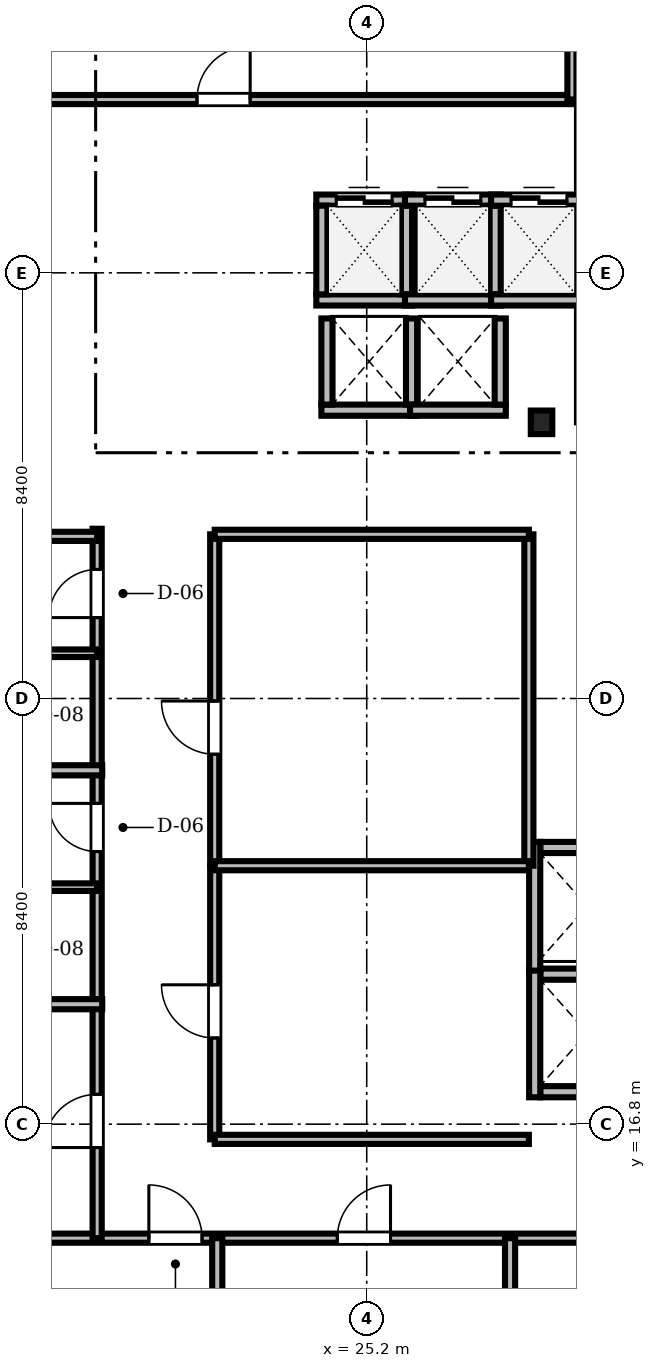
"""IFC4 building model, lengths in metres.
Left out: names, types, materials, properties, quantities, classifications, styles, units other than length and angle.
Written with IfcOpenShell. Run it as: python <this file> out.ifc"""

import sys

from ifc_helpers import new_model, si_unit, direction, frame, frame_2d, origin, origin_2d, place, context, subcontext, project, spatial, rectangle, i_section, extrude, source, transform, mapped, element, fill, save


model = new_model("IFC4")
c1 = context("Model", 3, precision=1e-05, world=origin(), true_north=direction((0.0, 1.0)))
c2 = subcontext(c1, "Body", "Model", "MODEL_VIEW")
j1 = project(units=[si_unit("LENGTHUNIT", "METRE"), si_unit("PLANEANGLEUNIT", "RADIAN")], contexts=[c1])
p1 = place(None, origin())
s1 = spatial("IfcSite", under=j1, at=p1, CompositionType="ELEMENT")
p2 = place(p1, origin())
s2 = spatial("IfcBuilding", under=s1, at=p2, CompositionType="ELEMENT")
p3 = place(p2, frame((0.0, 0.0, 144.6)))
s3 = spatial("IfcBuildingStorey", under=s2, at=p3, CompositionType="ELEMENT", Elevation=144.6)
m1 = source(origin(), c2, "Body", "SweptSolid", [
    extrude(i_section(OverallWidth=0.424, OverallDepth=0.465, WebThickness=0.035, FlangeThickness=0.056, FilletRadius=0.015, at=origin_2d()), origin(), (0.0, 0.0, 1.0), 3.46),
])
p4 = place(p3, frame((28.65, 30.65, 0.0), z_axis=(0.0, 0.0, 1.0), x_axis=(1.0, 0.0, 0.0)))
e1 = element("IfcColumn", 1, at=p4, inside=s3, PredefinedType="COLUMN", context=c2, shape_type="MappedRepresentation", body=[
    mapped(m1, transform((0.0, 0.0, 0.0), scale=1.0)),
])
m2 = source(origin(), c2, "Body", "SweptSolid", [
    extrude(rectangle(XDim=1.89, YDim=0.22, at=frame_2d((0.945, 0.0))), origin(), (0.0, 0.0, 1.0), 3.46),
])
p5 = place(p3, frame((24.205, 33.065, 0.0), z_axis=(0.0, 0.0, 1.0), x_axis=(1.0, 0.0, 0.0)))
e2 = element("IfcWall", 2, at=p5, inside=s3, PredefinedType="SOLIDWALL", context=c2, shape_type="MappedRepresentation", body=[
    mapped(m2, transform((0.0, 0.0, 0.0), scale=1.0)),
])
p6 = place(p3, frame((24.205, 35.035, 0.0), z_axis=(0.0, 0.0, 1.0), x_axis=(1.0, 0.0, 0.0)))
e3 = element("IfcWall", 3, at=p6, inside=s3, PredefinedType="SOLIDWALL", context=c2, shape_type="MappedRepresentation", body=[
    mapped(m2, transform((0.0, 0.0, 0.0), scale=1.0)),
])
m3 = source(origin(), c2, "Body", "SweptSolid", [
    extrude(rectangle(XDim=1.1, YDim=2.2, at=frame_2d((0.55, 1.1))), frame((0.0, 0.12, 0.0), z_axis=(0.0, -1.0, 0.0), x_axis=(1.0, 0.0, 0.0)), (0.0, 0.0, 1.0), 0.24),
])
p7 = place(p6, frame((0.395, 0.0, 0.0)))
e4 = element("IfcOpeningElement", 4, at=p7, cuts=e3, PredefinedType="OPENING", context=c2, shape_type="MappedRepresentation", body=[
    mapped(m3, transform((0.0, 0.0, 0.0), scale=1.0)),
])
m4 = source(origin(), c2, "Body", "SweptSolid", [
    extrude(rectangle(XDim=1.75, YDim=0.22, at=frame_2d((0.875, 0.0))), origin(), (0.0, 0.0, 1.0), 3.46),
])
for number, where, z_axis, x_axis in (
    (5, (24.315, 33.175, 0.0), (0.0, 0.0, 1.0), (0.0, 1.0, 0.0)),
    (6, (25.985, 33.175, 0.0), (0.0, 0.0, 1.0), (0.0, 1.0, 0.0)),
):
    element("IfcWall", number, at=place(p3, frame(where, z_axis=z_axis, x_axis=x_axis)), inside=s3, PredefinedType="SOLIDWALL", context=c2, shape_type="MappedRepresentation", body=[
        mapped(m4, transform((0.0, 0.0, 0.0), scale=1.0)),
    ])
p8 = place(p3, frame((25.955, 33.065, 0.0), z_axis=(0.0, 0.0, 1.0), x_axis=(1.0, 0.0, 0.0)))
e7 = element("IfcWall", 7, at=p8, inside=s3, PredefinedType="SOLIDWALL", context=c2, shape_type="MappedRepresentation", body=[
    mapped(m2, transform((0.0, 0.0, 0.0), scale=1.0)),
])
p9 = place(p3, frame((25.955, 35.035, 0.0), z_axis=(0.0, 0.0, 1.0), x_axis=(1.0, 0.0, 0.0)))
e8 = element("IfcWall", 8, at=p9, inside=s3, PredefinedType="SOLIDWALL", context=c2, shape_type="MappedRepresentation", body=[
    mapped(m2, transform((0.0, 0.0, 0.0), scale=1.0)),
])
p10 = place(p9, frame((0.395, 0.0, 0.0)))
e9 = element("IfcOpeningElement", 9, at=p10, cuts=e8, PredefinedType="OPENING", context=c2, shape_type="MappedRepresentation", body=[
    mapped(m3, transform((0.0, 0.0, 0.0), scale=1.0)),
])
p11 = place(p3, frame((27.735, 33.175, 0.0), z_axis=(0.0, 0.0, 1.0), x_axis=(0.0, 1.0, 0.0)))
e10 = element("IfcWall", 10, at=p11, inside=s3, PredefinedType="SOLIDWALL", context=c2, shape_type="MappedRepresentation", body=[
    mapped(m4, transform((0.0, 0.0, 0.0), scale=1.0)),
])
p12 = place(p3, frame((27.655, 33.065, 0.0), z_axis=(0.0, 0.0, 1.0), x_axis=(1.0, 0.0, 0.0)))
e11 = element("IfcWall", 11, at=p12, inside=s3, PredefinedType="SOLIDWALL", context=c2, shape_type="MappedRepresentation", body=[
    mapped(m2, transform((0.0, 0.0, 0.0), scale=1.0)),
])
p13 = place(p3, frame((27.655, 35.035, 0.0), z_axis=(0.0, 0.0, 1.0), x_axis=(1.0, 0.0, 0.0)))
e12 = element("IfcWall", 12, at=p13, inside=s3, PredefinedType="SOLIDWALL", context=c2, shape_type="MappedRepresentation", body=[
    mapped(m2, transform((0.0, 0.0, 0.0), scale=1.0)),
])
p14 = place(p13, frame((0.395, 0.0, 0.0)))
e13 = element("IfcOpeningElement", 13, at=p14, cuts=e12, PredefinedType="OPENING", context=c2, shape_type="MappedRepresentation", body=[
    mapped(m3, transform((0.0, 0.0, 0.0), scale=1.0)),
])
m5 = source(origin(), c2, "Body", "SweptSolid", [
    extrude(rectangle(XDim=1.89, YDim=0.22, at=frame_2d((0.945, 0.0))), origin(), (0.0, 0.0, 1.0), 3.46),
])
p15 = place(p3, frame((24.305, 30.89, 0.0), z_axis=(0.0, 0.0, 1.0), x_axis=(1.0, 0.0, 0.0)))
e14 = element("IfcWall", 14, at=p15, inside=s3, PredefinedType="SOLIDWALL", context=c2, shape_type="MappedRepresentation", body=[
    mapped(m5, transform((0.0, 0.0, 0.0), scale=1.0)),
])
m6 = source(origin(), c2, "Body", "SweptSolid", [
    extrude(rectangle(XDim=1.7, YDim=0.22, at=frame_2d((0.85, 0.0))), origin(), (0.0, 0.0, 1.0), 3.46),
])
for number, where, z_axis, x_axis in (
    (15, (24.415, 31.0, 0.0), (0.0, 0.0, 1.0), (0.0, 1.0, 0.0)),
    (16, (26.085, 31.0, 0.0), (0.0, 0.0, 1.0), (0.0, 1.0, 0.0)),
):
    element("IfcWall", number, at=place(p3, frame(where, z_axis=z_axis, x_axis=x_axis)), inside=s3, PredefinedType="SOLIDWALL", context=c2, shape_type="MappedRepresentation", body=[
        mapped(m6, transform((0.0, 0.0, 0.0), scale=1.0)),
    ])
p16 = place(p3, frame((26.055, 30.89, 0.0), z_axis=(0.0, 0.0, 1.0), x_axis=(1.0, 0.0, 0.0)))
e17 = element("IfcWall", 17, at=p16, inside=s3, PredefinedType="SOLIDWALL", context=c2, shape_type="MappedRepresentation", body=[
    mapped(m5, transform((0.0, 0.0, 0.0), scale=1.0)),
])
p17 = place(p3, frame((27.835, 31.0, 0.0), z_axis=(0.0, 0.0, 1.0), x_axis=(0.0, 1.0, 0.0)))
e18 = element("IfcWall", 18, at=p17, inside=s3, PredefinedType="SOLIDWALL", context=c2, shape_type="MappedRepresentation", body=[
    mapped(m6, transform((0.0, 0.0, 0.0), scale=1.0)),
])
m7 = source(origin(), c2, "Body", "SweptSolid", [
    extrude(rectangle(XDim=1.85, YDim=0.22, at=frame_2d((0.925, 0.0))), origin(), (0.0, 0.0, 1.0), 3.46),
])
for number, where, z_axis, x_axis in (
    (19, (28.625, 17.44, 0.0), (0.0, 0.0, 1.0), (1.0, 0.0, 0.0)),
    (20, (28.625, 19.76, 0.0), (0.0, 0.0, 1.0), (1.0, 0.0, 0.0)),
):
    element("IfcWall", number, at=place(p3, frame(where, z_axis=z_axis, x_axis=x_axis)), inside=s3, PredefinedType="SOLIDWALL", context=c2, shape_type="MappedRepresentation", body=[
        mapped(m7, transform((0.0, 0.0, 0.0), scale=1.0)),
    ])
m8 = source(origin(), c2, "Body", "SweptSolid", [
    extrude(rectangle(XDim=2.54, YDim=0.22, at=frame_2d((1.27, 0.0))), origin(), (0.0, 0.0, 1.0), 3.46),
])
p18 = place(p3, frame((28.515, 17.33, 0.0), z_axis=(0.0, 0.0, 1.0), x_axis=(0.0, 1.0, 0.0)))
e21 = element("IfcWall", 21, at=p18, inside=s3, PredefinedType="SOLIDWALL", context=c2, shape_type="MappedRepresentation", body=[
    mapped(m8, transform((0.0, 0.0, 0.0), scale=1.0)),
])
p19 = place(p3, frame((28.625, 22.26, 0.0), z_axis=(0.0, 0.0, 1.0), x_axis=(1.0, 0.0, 0.0)))
e22 = element("IfcWall", 22, at=p19, inside=s3, PredefinedType="SOLIDWALL", context=c2, shape_type="MappedRepresentation", body=[
    mapped(m7, transform((0.0, 0.0, 0.0), scale=1.0)),
])
p20 = place(p3, frame((28.515, 19.83, 0.0), z_axis=(0.0, 0.0, 1.0), x_axis=(0.0, 1.0, 0.0)))
e23 = element("IfcWall", 23, at=p20, inside=s3, PredefinedType="SOLIDWALL", context=c2, shape_type="MappedRepresentation", body=[
    mapped(m8, transform((0.0, 0.0, 0.0), scale=1.0)),
])
m9 = source(origin(), c2, "Body", "SweptSolid", [
    extrude(rectangle(XDim=46.156, YDim=0.18, at=frame_2d((23.078, 0.0))), origin(), (0.0, 0.0, 1.0), 2.702),
])
p21 = place(p3, frame((6.922, 14.55, 0.0), z_axis=(0.0, 0.0, 1.0), x_axis=(1.0, 0.0, 0.0)))
e24 = element("IfcWall", 24, at=p21, inside=s3, PredefinedType="PARTITIONING", context=c2, shape_type="MappedRepresentation", body=[
    mapped(m9, transform((0.0, 0.0, 0.0), scale=1.0)),
])
m10 = source(origin(), c2, "Body", "SweptSolid", [
    extrude(rectangle(XDim=1.05, YDim=2.2, at=frame_2d((0.525, 1.1))), frame((0.0, 0.1, 0.0), z_axis=(0.0, -1.0, 0.0), x_axis=(1.0, 0.0, 0.0)), (0.0, 0.0, 1.0), 0.2),
])
p22 = place(p21, frame((13.978, 0.0, 0.0)))
e25 = element("IfcOpeningElement", 25, at=p22, cuts=e24, PredefinedType="OPENING", context=c2, shape_type="MappedRepresentation", body=[
    mapped(m10, transform((0.0, 0.0, 0.0), scale=1.0)),
])
p23 = place(p21, frame((17.698, 0.0, 0.0)))
e26 = element("IfcOpeningElement", 26, at=p23, cuts=e24, PredefinedType="OPENING", context=c2, shape_type="MappedRepresentation", body=[
    mapped(m10, transform((0.0, 0.0, 0.0), scale=1.0)),
])
p24 = place(p21, frame((23.477, 0.0, 0.0)))
e27 = element("IfcOpeningElement", 27, at=p24, cuts=e24, PredefinedType="OPENING", context=c2, shape_type="MappedRepresentation", body=[
    mapped(m10, transform((0.0, 0.0, 0.0), scale=1.0)),
])
p25 = place(p21, frame((29.357, 0.0, 0.0)))
e28 = element("IfcOpeningElement", 28, at=p25, cuts=e24, PredefinedType="OPENING", context=c2, shape_type="MappedRepresentation", body=[
    mapped(m10, transform((0.0, 0.0, 0.0), scale=1.0)),
])
p26 = place(p21, frame((35.136, 0.0, 0.0)))
e29 = element("IfcOpeningElement", 29, at=p26, cuts=e24, PredefinedType="OPENING", context=c2, shape_type="MappedRepresentation", body=[
    mapped(m10, transform((0.0, 0.0, 0.0), scale=1.0)),
])
p27 = place(p21, frame((41.766, 0.0, 0.0)))
e30 = element("IfcOpeningElement", 30, at=p27, cuts=e24, PredefinedType="OPENING", context=c2, shape_type="MappedRepresentation", body=[
    mapped(m10, transform((0.0, 0.0, 0.0), scale=1.0)),
])
m11 = source(origin(), c2, "Body", "SweptSolid", [
    extrude(rectangle(XDim=22.328, YDim=0.18, at=frame_2d((11.164, 0.0))), origin(), (0.0, 0.0, 1.0), 2.702),
])
p28 = place(p3, frame((6.922, 37.02, 0.0), z_axis=(0.0, 0.0, 1.0), x_axis=(1.0, 0.0, 0.0)))
e31 = element("IfcWall", 31, at=p28, inside=s3, PredefinedType="PARTITIONING", context=c2, shape_type="MappedRepresentation", body=[
    mapped(m11, transform((0.0, 0.0, 0.0), scale=1.0)),
])
p29 = place(p28, frame((14.928, 0.0, 0.0)))
e32 = element("IfcOpeningElement", 32, at=p29, cuts=e31, PredefinedType="OPENING", context=c2, shape_type="MappedRepresentation", body=[
    mapped(m10, transform((0.0, 0.0, 0.0), scale=1.0)),
])
m12 = source(origin(), c2, "Body", "SweptSolid", [
    extrude(rectangle(XDim=14.0, YDim=0.18, at=frame_2d((7.0, 0.0))), origin(), (0.0, 0.0, 1.0), 2.852),
])
p30 = place(p3, frame((19.88, 14.55, 0.0), z_axis=(0.0, 0.0, 1.0), x_axis=(0.0, 1.0, 0.0)))
e33 = element("IfcWall", 33, at=p30, inside=s3, PredefinedType="PARTITIONING", context=c2, shape_type="MappedRepresentation", body=[
    mapped(m12, transform((0.0, 0.0, 0.0), scale=1.0)),
])
p31 = place(p30, frame((1.788, 0.0, 0.0)))
e34 = element("IfcOpeningElement", 34, at=p31, cuts=e33, PredefinedType="OPENING", context=c2, shape_type="MappedRepresentation", body=[
    mapped(m10, transform((0.0, 0.0, 0.0), scale=1.0)),
])
m13 = source(origin(), c2, "Body", "SweptSolid", [
    extrude(rectangle(XDim=0.95, YDim=2.15, at=frame_2d((0.475, 1.075))), frame((0.0, 0.1, 0.0), z_axis=(0.0, -1.0, 0.0), x_axis=(1.0, 0.0, 0.0)), (0.0, 0.0, 1.0), 0.2),
])
p32 = place(p30, frame((7.63, 0.0, 0.0)))
e35 = element("IfcOpeningElement", 35, at=p32, cuts=e33, PredefinedType="OPENING", context=c2, shape_type="MappedRepresentation", body=[
    mapped(m13, transform((0.0, 0.0, 0.0), scale=1.0)),
])
p33 = place(p30, frame((12.247, 0.0, 0.0)))
e36 = element("IfcOpeningElement", 36, at=p33, cuts=e33, PredefinedType="OPENING", context=c2, shape_type="MappedRepresentation", body=[
    mapped(m13, transform((0.0, 0.0, 0.0), scale=1.0)),
])
m14 = source(origin(), c2, "Body", "SweptSolid", [
    extrude(rectangle(XDim=6.54, YDim=0.18, at=frame_2d((3.27, 0.0))), origin(), (0.0, 0.0, 1.0), 2.852),
])
p34 = place(p3, frame((22.2, 21.9, 0.0), z_axis=(0.0, 0.0, 1.0), x_axis=(0.0, 1.0, 0.0)))
e37 = element("IfcWall", 37, at=p34, inside=s3, PredefinedType="PARTITIONING", context=c2, shape_type="MappedRepresentation", body=[
    mapped(m14, transform((0.0, 0.0, 0.0), scale=1.0)),
])
p35 = place(p34, frame((2.2, 0.0, 0.0)))
e38 = element("IfcOpeningElement", 38, at=p35, cuts=e37, PredefinedType="OPENING", context=c2, shape_type="MappedRepresentation", body=[
    mapped(m10, transform((0.0, 0.0, 0.0), scale=1.0)),
])
m15 = source(origin(), c2, "Body", "SweptSolid", [
    extrude(rectangle(XDim=5.4, YDim=0.18, at=frame_2d((2.7, 0.0))), origin(), (0.0, 0.0, 1.0), 2.852),
])
p36 = place(p3, frame((22.2, 16.5, 0.0), z_axis=(0.0, 0.0, 1.0), x_axis=(0.0, 1.0, 0.0)))
e39 = element("IfcWall", 39, at=p36, inside=s3, PredefinedType="PARTITIONING", context=c2, shape_type="MappedRepresentation", body=[
    mapped(m15, transform((0.0, 0.0, 0.0), scale=1.0)),
])
p37 = place(p36, frame((2.0, 0.0, 0.0)))
e40 = element("IfcOpeningElement", 40, at=p37, cuts=e39, PredefinedType="OPENING", context=c2, shape_type="MappedRepresentation", body=[
    mapped(m10, transform((0.0, 0.0, 0.0), scale=1.0)),
])
m16 = source(origin(), c2, "Body", "SweptSolid", [
    extrude(rectangle(XDim=13.058, YDim=0.2, at=frame_2d((6.529, 0.0))), origin(), (0.0, 0.0, 1.0), 2.702),
])
p38 = place(p3, frame((6.922, 19.167, 0.0), z_axis=(0.0, 0.0, 1.0), x_axis=(1.0, 0.0, 0.0)))
e41 = element("IfcWall", 41, at=p38, inside=s3, PredefinedType="PARTITIONING", context=c2, shape_type="MappedRepresentation", body=[
    mapped(m16, transform((0.0, 0.0, 0.0), scale=1.0)),
])
m17 = source(origin(), c2, "Body", "SweptSolid", [
    extrude(rectangle(XDim=13.25, YDim=0.2, at=frame_2d((6.625, 0.0))), origin(), (0.0, 0.0, 1.0), 2.702),
])
p39 = place(p3, frame((6.73, 23.783, 0.0), z_axis=(0.0, 0.0, 1.0), x_axis=(1.0, 0.0, 0.0)))
e42 = element("IfcWall", 42, at=p39, inside=s3, PredefinedType="PARTITIONING", context=c2, shape_type="MappedRepresentation", body=[
    mapped(m17, transform((0.0, 0.0, 0.0), scale=1.0)),
])
m18 = source(origin(), c2, "Body", "SweptSolid", [
    extrude(rectangle(XDim=13.15, YDim=0.18, at=frame_2d((6.575, 0.0))), origin(), (0.0, 0.0, 1.0), 2.702),
])
p40 = place(p3, frame((6.73, 28.4, 0.0), z_axis=(0.0, 0.0, 1.0), x_axis=(1.0, 0.0, 0.0)))
e43 = element("IfcWall", 43, at=p40, inside=s3, PredefinedType="PARTITIONING", context=c2, shape_type="MappedRepresentation", body=[
    mapped(m18, transform((0.0, 0.0, 0.0), scale=1.0)),
])
m19 = source(origin(), c2, "Body", "SweptSolid", [
    extrude(rectangle(XDim=12.428, YDim=0.2, at=frame_2d((6.214, 0.0))), origin(), (0.0, 0.0, 1.0), 2.702),
])
p41 = place(p3, frame((22.25, 2.122, 0.0), z_axis=(0.0, 0.0, 1.0), x_axis=(0.0, 1.0, 0.0)))
e44 = element("IfcWall", 44, at=p41, inside=s3, PredefinedType="PARTITIONING", context=c2, shape_type="MappedRepresentation", body=[
    mapped(m19, transform((0.0, 0.0, 0.0), scale=1.0)),
])
m20 = source(origin(), c2, "Body", "SweptSolid", [
    extrude(rectangle(XDim=12.62, YDim=0.2, at=frame_2d((6.31, 0.0))), origin(), (0.0, 0.0, 1.0), 2.702),
])
p42 = place(p3, frame((28.029, 1.93, 0.0), z_axis=(0.0, 0.0, 1.0), x_axis=(0.0, 1.0, 0.0)))
e45 = element("IfcWall", 45, at=p42, inside=s3, PredefinedType="PARTITIONING", context=c2, shape_type="MappedRepresentation", body=[
    mapped(m20, transform((0.0, 0.0, 0.0), scale=1.0)),
])
m21 = source(origin(), c2, "Body", "SweptSolid", [
    extrude(rectangle(XDim=11.45, YDim=0.18, at=frame_2d((5.725, 0.0))), origin(), (0.0, 0.0, 1.0), 2.702),
])
p43 = place(p3, frame((29.25, 37.02, 0.0), z_axis=(0.0, 0.0, 1.0), x_axis=(0.0, 1.0, 0.0)))
e46 = element("IfcWall", 46, at=p43, inside=s3, PredefinedType="PARTITIONING", context=c2, shape_type="MappedRepresentation", body=[
    mapped(m21, transform((0.0, 0.0, 0.0), scale=1.0)),
])
p44 = place(p3, frame((28.4, 21.9, 0.0), z_axis=(0.0, 0.0, 1.0), x_axis=(0.0, 1.0, 0.0)))
e47 = element("IfcWall", 47, at=p44, inside=s3, PredefinedType="PARTITIONING", context=c2, shape_type="MappedRepresentation", body=[
    mapped(m14, transform((0.0, 0.0, 0.0), scale=1.0)),
])
m22 = source(origin(), c2, "Body", "SweptSolid", [
    extrude(rectangle(XDim=6.2, YDim=0.18, at=frame_2d((3.1, 0.0))), origin(), (0.0, 0.0, 1.0), 3.46),
])
for number, where, z_axis, x_axis in (
    (48, (22.2, 16.5, 0.0), (0.0, 0.0, 1.0), (1.0, 0.0, 0.0)),
    (49, (22.2, 21.9, 0.0), (0.0, 0.0, 1.0), (1.0, 0.0, 0.0)),
    (50, (22.2, 28.44, 0.0), (0.0, 0.0, 1.0), (1.0, 0.0, 0.0)),
):
    element("IfcWall", number, at=place(p3, frame(where, z_axis=z_axis, x_axis=x_axis)), inside=s3, PredefinedType="PARTITIONING", context=c2, shape_type="MappedRepresentation", body=[
        mapped(m22, transform((0.0, 0.0, 0.0), scale=1.0)),
    ])
m23 = source(origin(), c2, "Body", "SweptSolid", [
    extrude(rectangle(XDim=2.36, YDim=0.15, at=frame_2d((1.18, 0.0))), origin(), (0.0, 0.0, 1.0), 3.46),
])
for number, where, z_axis, x_axis in (
    (51, (17.52, 21.477, 0.0), (0.0, 0.0, 1.0), (1.0, 0.0, 0.0)),
    (52, (17.52, 26.093, 0.0), (0.0, 0.0, 1.0), (1.0, 0.0, 0.0)),
):
    element("IfcWall", number, at=place(p3, frame(where, z_axis=z_axis, x_axis=x_axis)), inside=s3, PredefinedType="PARTITIONING", context=c2, shape_type="MappedRepresentation", body=[
        mapped(m23, transform((0.0, 0.0, 0.0), scale=1.0)),
    ])
m24 = source(origin(), c2, "Body", "SweptSolid", [
    extrude(rectangle(XDim=1.1, YDim=2.2, at=frame_2d((0.55, 1.1))), frame((0.0, 0.025, 0.0), z_axis=(0.0, -1.0, 0.0), x_axis=(1.0, 0.0, 0.0)), (0.0, 0.0, 1.0), 0.05),
])
p45 = place(p7, origin())
e53 = element("IfcDoor", 53, at=p45, inside=s3, OperationType="DOUBLE_DOOR_SLIDING", PredefinedType="DOOR", context=c2, shape_type="MappedRepresentation", body=[
    mapped(m24, transform((0.0, 0.0, 0.0), scale=1.0)),
])
fill(e4, e53)
p46 = place(p10, origin())
e54 = element("IfcDoor", 54, at=p46, inside=s3, OperationType="DOUBLE_DOOR_SLIDING", PredefinedType="DOOR", context=c2, shape_type="MappedRepresentation", body=[
    mapped(m24, transform((0.0, 0.0, 0.0), scale=1.0)),
])
fill(e9, e54)
p47 = place(p14, origin())
e55 = element("IfcDoor", 55, at=p47, inside=s3, OperationType="DOUBLE_DOOR_SLIDING", PredefinedType="DOOR", context=c2, shape_type="MappedRepresentation", body=[
    mapped(m24, transform((0.0, 0.0, 0.0), scale=1.0)),
])
fill(e13, e55)
m25 = source(origin(), c2, "Body", "SweptSolid", [
    extrude(rectangle(XDim=1.05, YDim=2.2, at=frame_2d((0.525, 1.1))), frame((0.0, 0.025, 0.0), z_axis=(0.0, -1.0, 0.0), x_axis=(1.0, 0.0, 0.0)), (0.0, 0.0, 1.0), 0.05),
])
p48 = place(p22, origin())
e56 = element("IfcDoor", 56, at=p48, inside=s3, OperationType="SINGLE_SWING_LEFT", PredefinedType="DOOR", context=c2, shape_type="MappedRepresentation", body=[
    mapped(m25, transform((0.0, 0.0, 0.0), scale=1.0)),
])
fill(e25, e56)
p49 = place(p23, origin())
e57 = element("IfcDoor", 57, at=p49, inside=s3, OperationType="SINGLE_SWING_RIGHT", PredefinedType="DOOR", context=c2, shape_type="MappedRepresentation", body=[
    mapped(m25, transform((0.0, 0.0, 0.0), scale=1.0)),
])
fill(e26, e57)
p50 = place(p29, origin())
e58 = element("IfcDoor", 58, at=p50, inside=s3, OperationType="SINGLE_SWING_RIGHT", PredefinedType="DOOR", context=c2, shape_type="MappedRepresentation", body=[
    mapped(m25, transform((0.0, 0.0, 0.0), scale=1.0)),
])
fill(e32, e58)
p51 = place(p31, origin())
e59 = element("IfcDoor", 59, at=p51, inside=s3, OperationType="SINGLE_SWING_LEFT", PredefinedType="DOOR", context=c2, shape_type="MappedRepresentation", body=[
    mapped(m25, transform((0.0, 0.0, 0.0), scale=1.0)),
])
fill(e34, e59)
m26 = source(origin(), c2, "Body", "SweptSolid", [
    extrude(rectangle(XDim=0.95, YDim=2.15, at=frame_2d((0.475, 1.075))), frame((0.0, 0.025, 0.0), z_axis=(0.0, -1.0, 0.0), x_axis=(1.0, 0.0, 0.0)), (0.0, 0.0, 1.0), 0.05),
])
p52 = place(p32, origin())
e60 = element("IfcDoor", 60, at=p52, inside=s3, OperationType="SINGLE_SWING_RIGHT", PredefinedType="DOOR", context=c2, shape_type="MappedRepresentation", body=[
    mapped(m26, transform((0.0, 0.0, 0.0), scale=1.0)),
])
fill(e35, e60)
p53 = place(p33, origin())
e61 = element("IfcDoor", 61, at=p53, inside=s3, OperationType="SINGLE_SWING_LEFT", PredefinedType="DOOR", context=c2, shape_type="MappedRepresentation", body=[
    mapped(m26, transform((0.0, 0.0, 0.0), scale=1.0)),
])
fill(e36, e61)
p54 = place(p35, origin())
e62 = element("IfcDoor", 62, at=p54, inside=s3, OperationType="SINGLE_SWING_RIGHT", PredefinedType="DOOR", context=c2, shape_type="MappedRepresentation", body=[
    mapped(m25, transform((0.0, 0.0, 0.0), scale=1.0)),
])
fill(e38, e62)
p55 = place(p37, origin())
e63 = element("IfcDoor", 63, at=p55, inside=s3, OperationType="SINGLE_SWING_RIGHT", PredefinedType="DOOR", context=c2, shape_type="MappedRepresentation", body=[
    mapped(m25, transform((0.0, 0.0, 0.0), scale=1.0)),
])
fill(e40, e63)
save(model, sys.argv[1])
